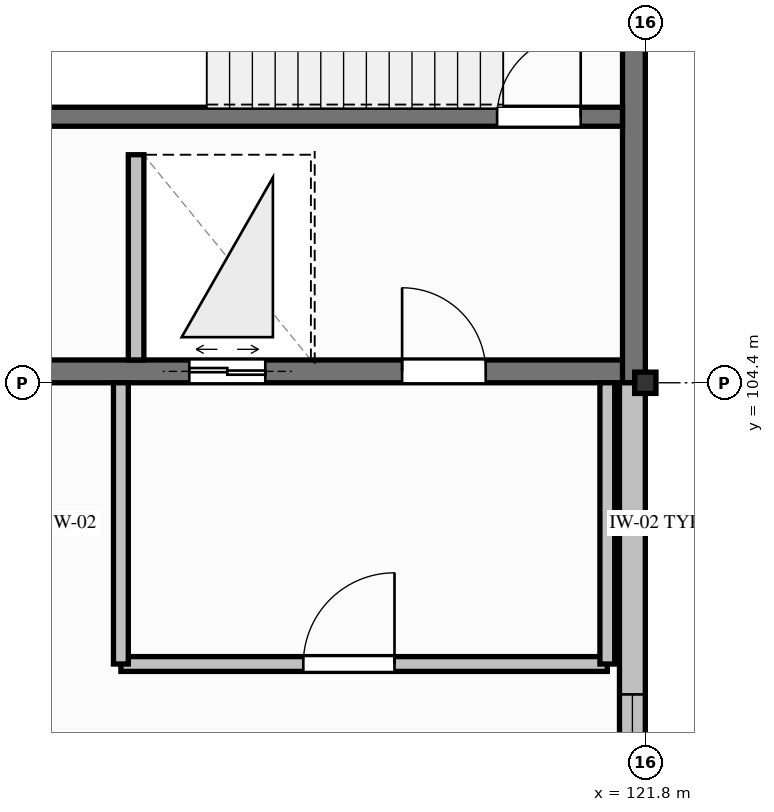
"""IFC4 building model, lengths in metres.
Left out: names, types, materials, properties, quantities, classifications, styles, units other than length and angle.
Written with IfcOpenShell. Run it as: python <this file> out.ifc"""

import sys

from ifc_helpers import new_model, si_unit, direction, frame, frame_2d, origin, origin_2d, place, context, subcontext, project, spatial, rectangle, i_section, extrude, element, fill, save


model = new_model("IFC4")
c1 = context("Model", 3, precision=1e-05, world=origin(), true_north=direction((0.0, 1.0)))
c2 = subcontext(c1, "Body", "Model", "MODEL_VIEW")
j1 = project(units=[si_unit("LENGTHUNIT", "METRE"), si_unit("PLANEANGLEUNIT", "RADIAN")], contexts=[c1])
p1 = place(None, origin())
s1 = spatial("IfcSite", under=j1, at=p1, CompositionType="ELEMENT")
p2 = place(p1, origin())
s2 = spatial("IfcBuilding", under=s1, at=p2, CompositionType="ELEMENT")
p3 = place(p2, frame((0.0, 0.0, 17.25)))
s3 = spatial("IfcBuildingStorey", under=s2, at=p3, CompositionType="ELEMENT", Elevation=17.25)
p4 = place(p3, frame((113.4, 104.55, 0.0), z_axis=(0.0, 0.0, 1.0), x_axis=(1.0, 0.0, 0.0)))
e1 = element("IfcWall", 1, at=p4, inside=s3, PredefinedType="SHEAR", context=c2, shape_type="SweptSolid", body=[
    extrude(rectangle(XDim=8.4, YDim=0.3, at=frame_2d((4.2, 0.0))), origin(), (0.0, 0.0, 1.0), 4.05),
])
p5 = place(p4, frame((5.2, 0.0, 0.0)))
e2 = element("IfcOpeningElement", 2, at=p5, cuts=e1, PredefinedType="OPENING", context=c2, shape_type="SweptSolid", body=[
    extrude(rectangle(XDim=1.1, YDim=2.15, at=frame_2d((0.55, 1.075))), frame((0.0, 0.16, 0.0), z_axis=(0.0, -1.0, 0.0), x_axis=(1.0, 0.0, 0.0)), (0.0, 0.0, 1.0), 0.32),
])
p6 = place(p4, frame((2.4, 0.0, 0.0)))
e3 = element("IfcOpeningElement", 3, at=p6, cuts=e1, PredefinedType="OPENING", context=c2, shape_type="SweptSolid", body=[
    extrude(rectangle(XDim=1.0, YDim=2.1, at=frame_2d((0.5, 1.05))), frame((0.0, 0.16, 0.0), z_axis=(0.0, -1.0, 0.0), x_axis=(1.0, 0.0, 0.0)), (0.0, 0.0, 1.0), 0.32),
])
p7 = place(p3, frame((121.65, 111.6, 0.0), z_axis=(0.0, 0.0, 1.0), x_axis=(0.0, -1.0, 0.0)))
e4 = element("IfcWall", 4, at=p7, inside=s3, PredefinedType="SHEAR", context=c2, shape_type="SweptSolid", body=[
    extrude(rectangle(XDim=7.2, YDim=0.3, at=frame_2d((3.6, 0.0))), origin(), (0.0, 0.0, 1.0), 4.05),
])
p8 = place(p3, frame((113.7, 107.9, 0.0), z_axis=(0.0, 0.0, 1.0), x_axis=(1.0, 0.0, 0.0)))
e5 = element("IfcWall", 5, at=p8, inside=s3, PredefinedType="SHEAR", context=c2, shape_type="SweptSolid", body=[
    extrude(rectangle(XDim=7.8, YDim=0.25, at=frame_2d((3.9, 0.0))), origin(), (0.0, 0.0, 1.0), 4.05),
])
p9 = place(p8, frame((6.15, 0.0, 0.0)))
e6 = element("IfcOpeningElement", 6, at=p9, cuts=e5, PredefinedType="OPENING", context=c2, shape_type="SweptSolid", body=[
    extrude(rectangle(XDim=1.1, YDim=2.15, at=frame_2d((0.55, 1.075))), frame((0.0, 0.135, 0.0), z_axis=(0.0, -1.0, 0.0), x_axis=(1.0, 0.0, 0.0)), (0.0, 0.0, 1.0), 0.27),
])
p10 = place(p3, frame((121.8, 104.4, 0.0), z_axis=(0.0, 0.0, 1.0), x_axis=(1.0, 0.0, 0.0)))
e7 = element("IfcColumn", 7, at=p10, inside=s3, PredefinedType="COLUMN", context=c2, shape_type="SweptSolid", body=[
    extrude(i_section(OverallWidth=0.28, OverallDepth=0.28, WebThickness=0.01, FlangeThickness=0.018, FilletRadius=0.024, at=origin_2d()), origin(), (0.0, 0.0, 1.0), 4.05),
])
p11 = place(p3, frame((121.63, 104.4, 0.0), z_axis=(0.0, 0.0, 1.0), x_axis=(0.0, -1.0, 0.0)))
e8 = element("IfcWall", 8, at=p11, inside=s3, PredefinedType="SOLIDWALL", context=c2, shape_type="SweptSolid", body=[
    extrude(rectangle(XDim=14.4, YDim=0.34, at=frame_2d((7.2, 0.0))), origin(), (0.0, 0.0, 1.0), 3.228),
])
p12 = place(p11, frame((4.1, 0.0, 0.85)))
e9 = element("IfcOpeningElement", 9, at=p12, cuts=e8, PredefinedType="OPENING", context=c2, shape_type="SweptSolid", body=[
    extrude(rectangle(XDim=1.4, YDim=1.65, at=frame_2d((0.7, 0.825))), frame((0.0, 0.18, 0.0), z_axis=(0.0, -1.0, 0.0), x_axis=(1.0, 0.0, 0.0)), (0.0, 0.0, 1.0), 0.36),
])
p13 = place(p11, frame((8.75, 0.0, 0.85)))
e10 = element("IfcOpeningElement", 10, at=p13, cuts=e8, PredefinedType="OPENING", context=c2, shape_type="SweptSolid", body=[
    extrude(rectangle(XDim=1.7, YDim=1.75, at=frame_2d((0.85, 0.875))), frame((0.0, 0.18, 0.0), z_axis=(0.0, -1.0, 0.0), x_axis=(1.0, 0.0, 0.0)), (0.0, 0.0, 1.0), 0.36),
])
p14 = place(p3, frame((115.1, 104.7, 0.0), z_axis=(0.0, 0.0, 1.0), x_axis=(0.0, 1.0, 0.0)))
e11 = element("IfcWall", 11, at=p14, inside=s3, PredefinedType="PARTITIONING", context=c2, shape_type="SweptSolid", body=[
    extrude(rectangle(XDim=2.7, YDim=0.205, at=frame_2d((1.35, 0.0))), origin(), (0.0, 0.0, 1.0), 3.78),
])
p15 = place(p3, frame((114.9, 100.7, 0.0), z_axis=(0.0, 0.0, 1.0), x_axis=(1.0, 0.0, 0.0)))
e12 = element("IfcWall", 12, at=p15, inside=s3, PredefinedType="PARTITIONING", context=c2, shape_type="SweptSolid", body=[
    extrude(rectangle(XDim=6.4, YDim=0.195, at=frame_2d((3.2, 0.0))), origin(), (0.0, 0.0, 1.0), 3.78),
])
p16 = place(p15, frame((2.4, 0.0, 0.0)))
e13 = element("IfcOpeningElement", 13, at=p16, cuts=e12, PredefinedType="OPENING", context=c2, shape_type="SweptSolid", body=[
    extrude(rectangle(XDim=1.2, YDim=2.15, at=frame_2d((0.6, 1.075))), frame((0.0, 0.107, 0.0), z_axis=(0.0, -1.0, 0.0), x_axis=(1.0, 0.0, 0.0)), (0.0, 0.0, 1.0), 0.215),
])
for number, where, z_axis, x_axis in (
    (14, (121.3, 100.7, 0.0), (0.0, 0.0, 1.0), (0.0, 1.0, 0.0)),
    (15, (114.9, 100.7, 0.0), (0.0, 0.0, 1.0), (0.0, 1.0, 0.0)),
):
    element("IfcWall", number, at=place(p3, frame(where, z_axis=z_axis, x_axis=x_axis)), inside=s3, PredefinedType="PARTITIONING", context=c2, shape_type="SweptSolid", body=[
        extrude(rectangle(XDim=3.7, YDim=0.195, at=frame_2d((1.85, 0.0))), origin(), (0.0, 0.0, 1.0), 3.378),
    ])
p17 = place(p12, origin())
e16 = element("IfcWindow", 16, at=p17, inside=s3, PartitioningType="SINGLE_PANEL", PredefinedType="WINDOW", context=c2, shape_type="SweptSolid", body=[
    extrude(rectangle(XDim=1.4, YDim=1.65, at=frame_2d((0.7, 0.825))), frame((0.0, 0.03, 0.0), z_axis=(0.0, -1.0, 0.0), x_axis=(1.0, 0.0, 0.0)), (0.0, 0.0, 1.0), 0.06),
])
fill(e9, e16)
p18 = place(p9, origin())
e17 = element("IfcDoor", 17, at=p18, inside=s3, OperationType="SINGLE_SWING_RIGHT", PredefinedType="DOOR", context=c2, shape_type="SweptSolid", body=[
    extrude(rectangle(XDim=1.1, YDim=2.15, at=frame_2d((0.55, 1.075))), frame((0.0, 0.025, 0.0), z_axis=(0.0, -1.0, 0.0), x_axis=(1.0, 0.0, 0.0)), (0.0, 0.0, 1.0), 0.05),
])
fill(e6, e17)
p19 = place(p5, origin())
e18 = element("IfcDoor", 18, at=p19, inside=s3, OperationType="SINGLE_SWING_LEFT", PredefinedType="DOOR", context=c2, shape_type="SweptSolid", body=[
    extrude(rectangle(XDim=1.1, YDim=2.15, at=frame_2d((0.55, 1.075))), frame((0.0, 0.025, 0.0), z_axis=(0.0, -1.0, 0.0), x_axis=(1.0, 0.0, 0.0)), (0.0, 0.0, 1.0), 0.05),
])
fill(e2, e18)
p20 = place(p6, origin())
e19 = element("IfcDoor", 19, at=p20, inside=s3, OperationType="DOUBLE_DOOR_SLIDING", PredefinedType="DOOR", context=c2, shape_type="SweptSolid", body=[
    extrude(rectangle(XDim=1.0, YDim=2.1, at=frame_2d((0.5, 1.05))), frame((0.0, 0.025, 0.0), z_axis=(0.0, -1.0, 0.0), x_axis=(1.0, 0.0, 0.0)), (0.0, 0.0, 1.0), 0.05),
])
fill(e3, e19)
p21 = place(p16, origin())
e20 = element("IfcDoor", 20, at=p21, inside=s3, OperationType="SINGLE_SWING_RIGHT", PredefinedType="DOOR", context=c2, shape_type="SweptSolid", body=[
    extrude(rectangle(XDim=1.2, YDim=2.15, at=frame_2d((0.6, 1.075))), frame((0.0, 0.025, 0.0), z_axis=(0.0, -1.0, 0.0), x_axis=(1.0, 0.0, 0.0)), (0.0, 0.0, 1.0), 0.05),
])
fill(e13, e20)
save(model, sys.argv[1])
